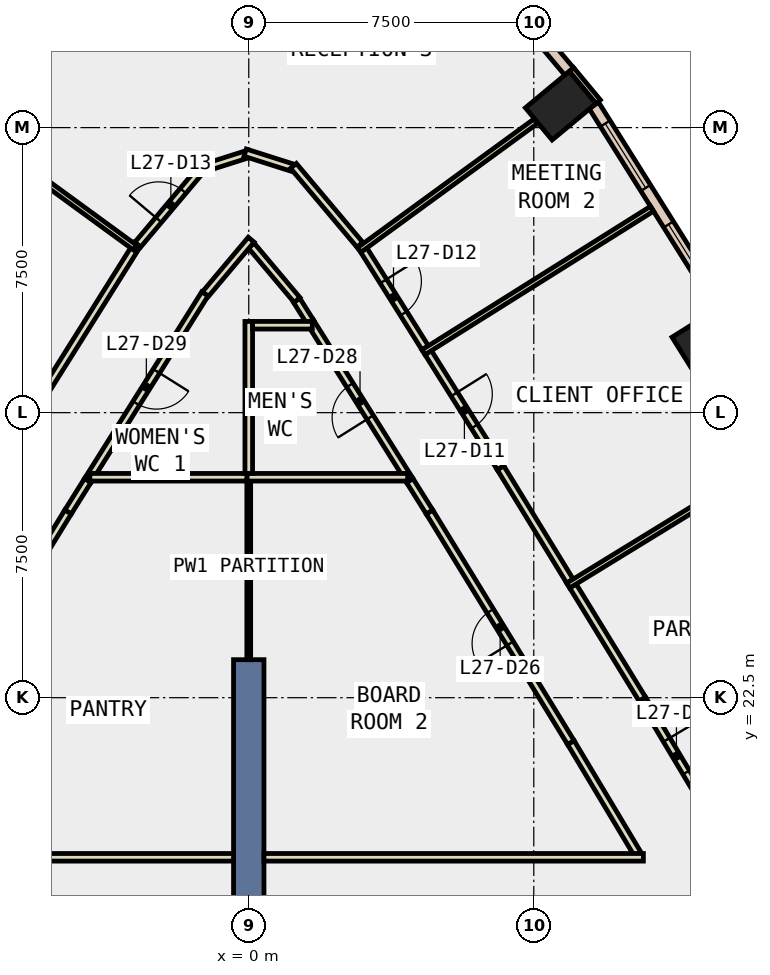
"""IFC4 building model, lengths in metres.
Left out: names, types, materials, properties, quantities, classifications, styles, units other than length and angle.
Written with IfcOpenShell. Run it as: python <this file> out.ifc"""

import sys

from ifc_helpers import new_model, si_unit, direction, frame, frame_2d, origin, origin_2d, place, context, subcontext, project, spatial, rectangle, extrude, element, fill, save


model = new_model("IFC4")
c1 = context("Model", 3, precision=1e-05, world=origin(), true_north=direction((0.0, 1.0)))
c2 = subcontext(c1, "Body", "Model", "MODEL_VIEW")
j1 = project(units=[si_unit("LENGTHUNIT", "METRE"), si_unit("PLANEANGLEUNIT", "RADIAN")], contexts=[c1])
p1 = place(None, origin())
s1 = spatial("IfcSite", under=j1, at=p1, CompositionType="ELEMENT")
p2 = place(p1, origin())
s2 = spatial("IfcBuilding", under=s1, at=p2, CompositionType="ELEMENT")
p3 = place(p2, frame((0.0, 0.0, 124.4)))
s3 = spatial("IfcBuildingStorey", under=s2, at=p3, CompositionType="ELEMENT", Elevation=124.4)
for number, where, z_axis, x_axis in (
    (1, (12.066, 31.917, -0.4), (0.0, 0.0, 1.0), (-0.53, 0.848, 0.0)),
    (2, (8.208, 38.077, -0.4), (0.0, 0.0, 1.0), (-0.638, 0.77, 0.0)),
):
    element("IfcColumn", number, at=place(p3, frame(where, z_axis=z_axis, x_axis=x_axis)), inside=s3, PredefinedType="COLUMN", context=c2, shape_type="SweptSolid", body=[
        extrude(rectangle(XDim=1.1, YDim=1.5, at=origin_2d()), origin(), (0.0, 0.0, 1.0), 4.2),
    ])
p4 = place(p3, frame((0.0, 14.5, -0.4), z_axis=(0.0, 0.0, 1.0), x_axis=(0.0, 1.0, 0.0)))
e3 = element("IfcWall", 3, at=p4, inside=s3, PredefinedType="SHEAR", context=c2, shape_type="SweptSolid", body=[
    extrude(rectangle(XDim=9.0, YDim=0.8, at=frame_2d((4.5, 0.0))), origin(), (0.0, 0.0, 1.0), 4.2),
])
p5 = place(p3, frame((9.194, 38.181, 0.0), z_axis=(0.0, 0.0, 1.0), x_axis=(-0.638566874111, 0.769566337159, 0.0)))
e4 = element("IfcWall", 4, at=p5, inside=s3, PredefinedType="STANDARD", context=c2, shape_type="SweptSolid", body=[
    extrude(rectangle(XDim=1.1, YDim=0.15, at=frame_2d((0.55, 0.0))), origin(), (0.0, 0.0, 1.0), 3.8),
])
p6 = place(p3, frame((12.41, 32.779, 0.0), z_axis=(0.0, 0.0, 1.0), x_axis=(-0.53160564075, 0.846991996847, 0.0)))
e5 = element("IfcWall", 5, at=p6, inside=s3, PredefinedType="STANDARD", context=c2, shape_type="SweptSolid", body=[
    extrude(rectangle(XDim=6.266, YDim=0.3, at=frame_2d((3.133, 0.0))), origin(), (0.0, 0.0, 1.0), 3.8),
])
p7 = place(p6, frame((0.566, 0.0, 0.9)))
e6 = element("IfcOpeningElement", 6, at=p7, cuts=e5, PredefinedType="OPENING", context=c2, shape_type="SweptSolid", body=[
    extrude(rectangle(XDim=2.0, YDim=2.6, at=frame_2d((1.0, 1.3))), frame((0.0, 0.16, 0.0), z_axis=(0.0, -1.0, 0.0), x_axis=(1.0, 0.0, 0.0)), (0.0, 0.0, 1.0), 0.32),
])
p8 = place(p6, frame((3.699, 0.0, 0.9)))
e7 = element("IfcOpeningElement", 7, at=p8, cuts=e5, PredefinedType="OPENING", context=c2, shape_type="SweptSolid", body=[
    extrude(rectangle(XDim=2.0, YDim=2.6, at=frame_2d((1.0, 1.3))), frame((0.0, 0.16, 0.0), z_axis=(0.0, -1.0, 0.0), x_axis=(1.0, 0.0, 0.0)), (0.0, 0.0, 1.0), 0.32),
])
p9 = place(p3, frame((8.432, 38.976, 0.0), z_axis=(0.0, 0.0, 1.0), x_axis=(-0.643948600943, 0.765068754652, 0.0)))
e8 = element("IfcWall", 8, at=p9, inside=s3, PredefinedType="STANDARD", context=c2, shape_type="SweptSolid", body=[
    extrude(rectangle(XDim=4.138, YDim=0.3, at=frame_2d((2.069, 0.0))), origin(), (0.0, 0.0, 1.0), 3.8),
])
p10 = place(p9, frame((1.369, 0.0, 0.9)))
e9 = element("IfcOpeningElement", 9, at=p10, cuts=e8, PredefinedType="OPENING", context=c2, shape_type="SweptSolid", body=[
    extrude(rectangle(XDim=1.4, YDim=2.6, at=frame_2d((0.7, 1.3))), frame((0.0, 0.16, 0.0), z_axis=(0.0, -1.0, 0.0), x_axis=(1.0, 0.0, 0.0)), (0.0, 0.0, 1.0), 0.32),
])
p11 = place(p3, frame((10.232, 18.386, 0.0), z_axis=(0.0, 0.0, 1.0), x_axis=(-0.513592824646, 0.858034038062, 0.0)))
e10 = element("IfcWall", 10, at=p11, inside=s3, PredefinedType="PARTITIONING", context=c2, shape_type="SweptSolid", body=[
    extrude(rectangle(XDim=3.421, YDim=0.2, at=frame_2d((1.71, 0.0))), origin(), (0.0, 0.0, 1.0), 3.8),
])
p12 = place(p3, frame((8.475, 21.321, 0.0), z_axis=(0.0, 0.0, 1.0), x_axis=(-0.522743103274, 0.852490262689, 0.0)))
e11 = element("IfcWall", 11, at=p12, inside=s3, PredefinedType="PARTITIONING", context=c2, shape_type="SweptSolid", body=[
    extrude(rectangle(XDim=7.115, YDim=0.2, at=frame_2d((3.557, 0.0))), origin(), (0.0, 0.0, 1.0), 3.8),
])
p13 = place(p12, frame((3.057, 0.0, 0.0)))
e12 = element("IfcOpeningElement", 12, at=p13, cuts=e11, PredefinedType="OPENING", context=c2, shape_type="SweptSolid", body=[
    extrude(rectangle(XDim=1.0, YDim=2.1, at=frame_2d((0.5, 1.05))), frame((0.0, 0.11, 0.0), z_axis=(0.0, -1.0, 0.0), x_axis=(1.0, 0.0, 0.0)), (0.0, 0.0, 1.0), 0.22),
])
for number, where, z_axis, x_axis in (
    (13, (4.756, 27.386, 0.0), (0.0, 0.0, 1.0), (-0.531, 0.847, 0.0)),
    (14, (-4.236, 28.215, 0.0), (0.0, 0.0, 1.0), (-0.531, -0.847, 0.0)),
):
    element("IfcWall", number, at=place(p3, frame(where, z_axis=z_axis, x_axis=x_axis)), inside=s3, PredefinedType="PARTITIONING", context=c2, shape_type="SweptSolid", body=[
        extrude(rectangle(XDim=0.979, YDim=0.2, at=frame_2d((0.489, 0.0))), origin(), (0.0, 0.0, 1.0), 3.8),
    ])
p14 = place(p3, frame((-4.756, 27.386, 0.0), z_axis=(0.0, 0.0, 1.0), x_axis=(-0.522743103274, -0.852490262689, 0.0)))
e15 = element("IfcWall", 15, at=p14, inside=s3, PredefinedType="PARTITIONING", context=c2, shape_type="SweptSolid", body=[
    extrude(rectangle(XDim=7.115, YDim=0.2, at=frame_2d((3.557, 0.0))), origin(), (0.0, 0.0, 1.0), 3.8),
])
p15 = place(p14, frame((3.057, 0.0, 0.0)))
e16 = element("IfcOpeningElement", 16, at=p15, cuts=e15, PredefinedType="OPENING", context=c2, shape_type="SweptSolid", body=[
    extrude(rectangle(XDim=1.0, YDim=2.1, at=frame_2d((0.5, 1.05))), frame((0.0, 0.11, 0.0), z_axis=(0.0, -1.0, 0.0), x_axis=(1.0, 0.0, 0.0)), (0.0, 0.0, 1.0), 0.22),
])
p16 = place(p3, frame((4.236, 28.215, 0.0), z_axis=(0.0, 0.0, 1.0), x_axis=(-0.531602694807, 0.84699384583, 0.0)))
e17 = element("IfcWall", 17, at=p16, inside=s3, PredefinedType="PARTITIONING", context=c2, shape_type="SweptSolid", body=[
    extrude(rectangle(XDim=4.923, YDim=0.2, at=frame_2d((2.461, 0.0))), origin(), (0.0, 0.0, 1.0), 3.8),
])
p17 = place(p16, frame((1.961, 0.0, 0.0)))
e18 = element("IfcOpeningElement", 18, at=p17, cuts=e17, PredefinedType="OPENING", context=c2, shape_type="SweptSolid", body=[
    extrude(rectangle(XDim=1.0, YDim=2.1, at=frame_2d((0.5, 1.05))), frame((0.0, 0.11, 0.0), z_axis=(0.0, -1.0, 0.0), x_axis=(1.0, 0.0, 0.0)), (0.0, 0.0, 1.0), 0.22),
])
p18 = place(p3, frame((1.619, 32.385, 0.0), z_axis=(0.0, 0.0, 1.0), x_axis=(-0.532112237469, 0.84667382547, 0.0)))
e19 = element("IfcWall", 19, at=p18, inside=s3, PredefinedType="PARTITIONING", context=c2, shape_type="SweptSolid", body=[
    extrude(rectangle(XDim=0.675, YDim=0.2, at=frame_2d((0.337, 0.0))), origin(), (0.0, 0.0, 1.0), 3.8),
])
p19 = place(p3, frame((1.271, 32.964, 0.0), z_axis=(0.0, 0.0, 1.0), x_axis=(-0.644007376392, 0.765019280249, 0.0)))
e20 = element("IfcWall", 20, at=p19, inside=s3, PredefinedType="PARTITIONING", context=c2, shape_type="SweptSolid", body=[
    extrude(rectangle(XDim=1.874, YDim=0.2, at=frame_2d((0.937, 0.0))), origin(), (0.0, 0.0, 1.0), 3.8),
])
p20 = place(p3, frame((0.064, 34.551, 0.0), z_axis=(0.0, 0.0, 1.0), x_axis=(-0.643638095982, -0.765329995101, 0.0)))
e21 = element("IfcWall", 21, at=p20, inside=s3, PredefinedType="PARTITIONING", context=c2, shape_type="SweptSolid", body=[
    extrude(rectangle(XDim=1.874, YDim=0.2, at=frame_2d((0.937, 0.0))), origin(), (0.0, 0.0, 1.0), 3.8),
])
p21 = place(p3, frame((-1.154, 33.125, 0.0), z_axis=(0.0, 0.0, 1.0), x_axis=(-0.531652223099, -0.846962758139, 0.0)))
e22 = element("IfcWall", 22, at=p21, inside=s3, PredefinedType="PARTITIONING", context=c2, shape_type="SweptSolid", body=[
    extrude(rectangle(XDim=5.797, YDim=0.2, at=frame_2d((2.898, 0.0))), origin(), (0.0, 0.0, 1.0), 3.8),
])
p22 = place(p21, frame((2.399, 0.0, 0.0)))
e23 = element("IfcOpeningElement", 23, at=p22, cuts=e22, PredefinedType="OPENING", context=c2, shape_type="SweptSolid", body=[
    extrude(rectangle(XDim=1.0, YDim=2.1, at=frame_2d((0.5, 1.05))), frame((0.0, 0.11, 0.0), z_axis=(0.0, -1.0, 0.0), x_axis=(1.0, 0.0, 0.0)), (0.0, 0.0, 1.0), 0.22),
])
p23 = place(p3, frame((8.531, 25.439, 0.0), z_axis=(0.0, 0.0, 1.0), x_axis=(0.522704631836, -0.852513852003, 0.0)))
e24 = element("IfcWall", 24, at=p23, inside=s3, PredefinedType="PARTITIONING", context=c2, shape_type="SweptSolid", body=[
    extrude(rectangle(XDim=3.493, YDim=0.2, at=frame_2d((1.747, 0.0))), origin(), (0.0, 0.0, 1.0), 3.8),
])
p24 = place(p3, frame((10.357, 22.461, 0.0), z_axis=(0.0, 0.0, 1.0), x_axis=(0.513467759888, -0.858108885606, 0.0)))
e25 = element("IfcWall", 25, at=p24, inside=s3, PredefinedType="PARTITIONING", context=c2, shape_type="SweptSolid", body=[
    extrude(rectangle(XDim=3.494, YDim=0.2, at=frame_2d((1.747, 0.0))), origin(), (0.0, 0.0, 1.0), 3.8),
])
p25 = place(p24, frame((1.247, 0.0, 0.0)))
e26 = element("IfcOpeningElement", 26, at=p25, cuts=e25, PredefinedType="OPENING", context=c2, shape_type="SweptSolid", body=[
    extrude(rectangle(XDim=1.0, YDim=2.1, at=frame_2d((0.5, 1.05))), frame((0.0, 0.11, 0.0), z_axis=(0.0, -1.0, 0.0), x_axis=(1.0, 0.0, 0.0)), (0.0, 0.0, 1.0), 0.22),
])
p26 = place(p3, frame((4.722, 31.579, 0.0), z_axis=(0.0, 0.0, 1.0), x_axis=(0.531664655861, -0.846954953766, 0.0)))
e27 = element("IfcWall", 27, at=p26, inside=s3, PredefinedType="PARTITIONING", context=c2, shape_type="SweptSolid", body=[
    extrude(rectangle(XDim=3.581, YDim=0.2, at=frame_2d((1.791, 0.0))), origin(), (0.0, 0.0, 1.0), 3.8),
])
p27 = place(p26, frame((1.291, 0.0, 0.0)))
e28 = element("IfcOpeningElement", 28, at=p27, cuts=e27, PredefinedType="OPENING", context=c2, shape_type="SweptSolid", body=[
    extrude(rectangle(XDim=1.0, YDim=2.1, at=frame_2d((0.5, 1.05))), frame((0.0, 0.11, 0.0), z_axis=(0.0, -1.0, 0.0), x_axis=(1.0, 0.0, 0.0)), (0.0, 0.0, 1.0), 0.22),
])
p28 = place(p3, frame((6.626, 28.546, 0.0), z_axis=(0.0, 0.0, 1.0), x_axis=(0.522580081027, -0.852590205734, 0.0)))
e29 = element("IfcWall", 29, at=p28, inside=s3, PredefinedType="PARTITIONING", context=c2, shape_type="SweptSolid", body=[
    extrude(rectangle(XDim=3.494, YDim=0.2, at=frame_2d((1.747, 0.0))), origin(), (0.0, 0.0, 1.0), 3.8),
])
p29 = place(p3, frame((2.975, 34.361, 0.0), z_axis=(0.0, 0.0, 1.0), x_axis=(0.531740854333, -0.846907116414, 0.0)))
e30 = element("IfcWall", 30, at=p29, inside=s3, PredefinedType="PARTITIONING", context=c2, shape_type="SweptSolid", body=[
    extrude(rectangle(XDim=3.135, YDim=0.2, at=frame_2d((1.567, 0.0))), origin(), (0.0, 0.0, 1.0), 3.8),
])
p30 = place(p29, frame((1.068, 0.0, 0.0)))
e31 = element("IfcOpeningElement", 31, at=p30, cuts=e30, PredefinedType="OPENING", context=c2, shape_type="SweptSolid", body=[
    extrude(rectangle(XDim=1.0, YDim=2.1, at=frame_2d((0.5, 1.05))), frame((0.0, 0.11, 0.0), z_axis=(0.0, -1.0, 0.0), x_axis=(1.0, 0.0, 0.0)), (0.0, 0.0, 1.0), 0.22),
])
p31 = place(p3, frame((-2.924, 34.417, 0.0), z_axis=(0.0, 0.0, 1.0), x_axis=(0.644113583568, 0.764929860486, 0.0)))
e32 = element("IfcWall", 32, at=p31, inside=s3, PredefinedType="PARTITIONING", context=c2, shape_type="SweptSolid", body=[
    extrude(rectangle(XDim=2.714, YDim=0.2, at=frame_2d((1.357, 0.0))), origin(), (0.0, 0.0, 1.0), 3.8),
])
p32 = place(p31, frame((0.857, 0.0, 0.0)))
e33 = element("IfcOpeningElement", 33, at=p32, cuts=e32, PredefinedType="OPENING", context=c2, shape_type="SweptSolid", body=[
    extrude(rectangle(XDim=1.0, YDim=2.1, at=frame_2d((0.5, 1.05))), frame((0.0, 0.11, 0.0), z_axis=(0.0, -1.0, 0.0), x_axis=(1.0, 0.0, 0.0)), (0.0, 0.0, 1.0), 0.22),
])
p33 = place(p3, frame((-1.145, 36.447, 0.0), z_axis=(0.0, 0.0, 1.0), x_axis=(0.952957783381, 0.303103056886, 0.0)))
e34 = element("IfcWall", 34, at=p33, inside=s3, PredefinedType="PARTITIONING", context=c2, shape_type="SweptSolid", body=[
    extrude(rectangle(XDim=1.102, YDim=0.2, at=frame_2d((0.551, 0.0))), origin(), (0.0, 0.0, 1.0), 3.8),
])
p34 = place(p3, frame((-0.095, 36.841, 0.0), z_axis=(0.0, 0.0, 1.0), x_axis=(0.953036611979, -0.302855107646, 0.0)))
e35 = element("IfcWall", 35, at=p34, inside=s3, PredefinedType="PARTITIONING", context=c2, shape_type="SweptSolid", body=[
    extrude(rectangle(XDim=1.301, YDim=0.2, at=frame_2d((0.65, 0.0))), origin(), (0.0, 0.0, 1.0), 3.8),
])
p35 = place(p3, frame((1.176, 36.493, 0.0), z_axis=(0.0, 0.0, 1.0), x_axis=(0.644113583568, -0.764929860486, 0.0)))
e36 = element("IfcWall", 36, at=p35, inside=s3, PredefinedType="PARTITIONING", context=c2, shape_type="SweptSolid", body=[
    extrude(rectangle(XDim=2.714, YDim=0.2, at=frame_2d((1.357, 0.0))), origin(), (0.0, 0.0, 1.0), 3.8),
])
p36 = place(p3, frame((-6.626, 28.546, 0.0), z_axis=(0.0, 0.0, 1.0), x_axis=(0.531701842465, 0.846931609234, 0.0)))
e37 = element("IfcWall", 37, at=p36, inside=s3, PredefinedType="PARTITIONING", context=c2, shape_type="SweptSolid", body=[
    extrude(rectangle(XDim=6.942, YDim=0.2, at=frame_2d((3.471, 0.0))), origin(), (0.0, 0.0, 1.0), 3.8),
])
for number, where, z_axis, x_axis in (
    (38, (0.4, 18.3, 0.0), (0.0, 0.0, 1.0), (1.0, 0.0, 0.0)),
    (39, (-10.384, 18.3, 0.0), (0.0, 0.0, 1.0), (1.0, 0.0, 0.0)),
):
    element("IfcWall", number, at=place(p3, frame(where, z_axis=z_axis, x_axis=x_axis)), inside=s3, PredefinedType="PARTITIONING", context=c2, shape_type="SweptSolid", body=[
        extrude(rectangle(XDim=9.984, YDim=0.2, at=frame_2d((4.992, 0.0))), origin(), (0.0, 0.0, 1.0), 3.8),
    ])
p37 = place(p3, frame((0.0, 23.5, 0.0), z_axis=(0.0, 0.0, 1.0), x_axis=(0.0, 1.0, 0.0)))
e40 = element("IfcWall", 40, at=p37, inside=s3, PredefinedType="PARTITIONING", context=c2, shape_type="SweptSolid", body=[
    extrude(rectangle(XDim=4.9, YDim=0.1, at=frame_2d((2.45, 0.0))), origin(), (0.0, 0.0, 1.0), 3.8),
])
p38 = place(p3, frame((-0.05, 28.3, 0.0), z_axis=(0.0, 0.0, 1.0), x_axis=(1.0, 0.0, 0.0)))
e41 = element("IfcWall", 41, at=p38, inside=s3, PredefinedType="PARTITIONING", context=c2, shape_type="SweptSolid", body=[
    extrude(rectangle(XDim=4.232, YDim=0.2, at=frame_2d((2.116, 0.0))), origin(), (0.0, 0.0, 1.0), 3.8),
])
p39 = place(p3, frame((-4.182, 28.3, 0.0), z_axis=(0.0, 0.0, 1.0), x_axis=(1.0, 0.0, 0.0)))
e42 = element("IfcWall", 42, at=p39, inside=s3, PredefinedType="PARTITIONING", context=c2, shape_type="SweptSolid", body=[
    extrude(rectangle(XDim=4.132, YDim=0.2, at=frame_2d((2.066, 0.0))), origin(), (0.0, 0.0, 1.0), 3.8),
])
p40 = place(p3, frame((0.0, 28.4, 0.0), z_axis=(0.0, 0.0, 1.0), x_axis=(0.0, 1.0, 0.0)))
e43 = element("IfcWall", 43, at=p40, inside=s3, PredefinedType="PARTITIONING", context=c2, shape_type="SweptSolid", body=[
    extrude(rectangle(XDim=4.0, YDim=0.2, at=frame_2d((2.0, 0.0))), origin(), (0.0, 0.0, 1.0), 3.8),
])
p41 = place(p3, frame((0.1, 32.3, 0.0), z_axis=(0.0, 0.0, 1.0), x_axis=(1.0, 0.0, 0.0)))
e44 = element("IfcWall", 44, at=p41, inside=s3, PredefinedType="PARTITIONING", context=c2, shape_type="SweptSolid", body=[
    extrude(rectangle(XDim=1.572, YDim=0.2, at=frame_2d((0.786, 0.0))), origin(), (0.0, 0.0, 1.0), 3.8),
])
p42 = place(p3, frame((8.406, 25.451, 0.0), z_axis=(0.0, 0.0, 1.0), x_axis=(0.852520194289, 0.522694287637, 0.0)))
e45 = element("IfcWall", 45, at=p42, inside=s3, PredefinedType="PARTITIONING", context=c2, shape_type="SweptSolid", body=[
    extrude(rectangle(XDim=7.1, YDim=0.15, at=frame_2d((3.55, 0.0))), origin(), (0.0, 0.0, 1.0), 3.8),
])
p43 = place(p3, frame((4.597, 31.589, 0.0), z_axis=(0.0, 0.0, 1.0), x_axis=(0.846980720953, 0.531623605885, 0.0)))
e46 = element("IfcWall", 46, at=p43, inside=s3, PredefinedType="PARTITIONING", context=c2, shape_type="SweptSolid", body=[
    extrude(rectangle(XDim=7.101, YDim=0.15, at=frame_2d((3.55, 0.0))), origin(), (0.0, 0.0, 1.0), 3.8),
])
p44 = place(p3, frame((2.908, 34.281, 0.0), z_axis=(0.0, 0.0, 1.0), x_axis=(0.807935867, 0.589270425879, 0.0)))
e47 = element("IfcWall", 47, at=p44, inside=s3, PredefinedType="PARTITIONING", context=c2, shape_type="SweptSolid", body=[
    extrude(rectangle(XDim=5.744, YDim=0.15, at=frame_2d((2.872, 0.0))), origin(), (0.0, 0.0, 1.0), 3.8),
])
p45 = place(p3, frame((-2.989, 34.34, 0.0), z_axis=(0.0, 0.0, 1.0), x_axis=(-0.807932877043, 0.589274525322, 0.0)))
e48 = element("IfcWall", 48, at=p45, inside=s3, PredefinedType="PARTITIONING", context=c2, shape_type="SweptSolid", body=[
    extrude(rectangle(XDim=5.644, YDim=0.15, at=frame_2d((2.822, 0.0))), origin(), (0.0, 0.0, 1.0), 3.8),
])
p46 = place(p7, origin())
e49 = element("IfcWindow", 49, at=p46, inside=s3, PartitioningType="SINGLE_PANEL", PredefinedType="WINDOW", context=c2, shape_type="SweptSolid", body=[
    extrude(rectangle(XDim=2.0, YDim=2.6, at=frame_2d((1.0, 1.3))), frame((0.0, 0.03, 0.0), z_axis=(0.0, -1.0, 0.0), x_axis=(1.0, 0.0, 0.0)), (0.0, 0.0, 1.0), 0.06),
])
fill(e6, e49)
p47 = place(p8, origin())
e50 = element("IfcWindow", 50, at=p47, inside=s3, PartitioningType="SINGLE_PANEL", PredefinedType="WINDOW", context=c2, shape_type="SweptSolid", body=[
    extrude(rectangle(XDim=2.0, YDim=2.6, at=frame_2d((1.0, 1.3))), frame((0.0, 0.03, 0.0), z_axis=(0.0, -1.0, 0.0), x_axis=(1.0, 0.0, 0.0)), (0.0, 0.0, 1.0), 0.06),
])
fill(e7, e50)
p48 = place(p25, origin())
e51 = element("IfcDoor", 51, at=p48, inside=s3, OperationType="SINGLE_SWING_RIGHT", PredefinedType="DOOR", context=c2, shape_type="SweptSolid", body=[
    extrude(rectangle(XDim=1.0, YDim=2.1, at=frame_2d((0.5, 1.05))), frame((0.0, 0.025, 0.0), z_axis=(0.0, -1.0, 0.0), x_axis=(1.0, 0.0, 0.0)), (0.0, 0.0, 1.0), 0.05),
])
fill(e26, e51)
p49 = place(p27, origin())
e52 = element("IfcDoor", 52, at=p49, inside=s3, OperationType="SINGLE_SWING_LEFT", PredefinedType="DOOR", context=c2, shape_type="SweptSolid", body=[
    extrude(rectangle(XDim=1.0, YDim=2.1, at=frame_2d((0.5, 1.05))), frame((0.0, 0.025, 0.0), z_axis=(0.0, -1.0, 0.0), x_axis=(1.0, 0.0, 0.0)), (0.0, 0.0, 1.0), 0.05),
])
fill(e28, e52)
p50 = place(p30, origin())
e53 = element("IfcDoor", 53, at=p50, inside=s3, OperationType="SINGLE_SWING_LEFT", PredefinedType="DOOR", context=c2, shape_type="SweptSolid", body=[
    extrude(rectangle(XDim=1.0, YDim=2.1, at=frame_2d((0.5, 1.05))), frame((0.0, 0.025, 0.0), z_axis=(0.0, -1.0, 0.0), x_axis=(1.0, 0.0, 0.0)), (0.0, 0.0, 1.0), 0.05),
])
fill(e31, e53)
p51 = place(p32, origin())
e54 = element("IfcDoor", 54, at=p51, inside=s3, OperationType="SINGLE_SWING_LEFT", PredefinedType="DOOR", context=c2, shape_type="SweptSolid", body=[
    extrude(rectangle(XDim=1.0, YDim=2.1, at=frame_2d((0.5, 1.05))), frame((0.0, 0.025, 0.0), z_axis=(0.0, -1.0, 0.0), x_axis=(1.0, 0.0, 0.0)), (0.0, 0.0, 1.0), 0.05),
])
fill(e33, e54)
p52 = place(p13, origin())
e55 = element("IfcDoor", 55, at=p52, inside=s3, OperationType="SINGLE_SWING_RIGHT", PredefinedType="DOOR", context=c2, shape_type="SweptSolid", body=[
    extrude(rectangle(XDim=1.0, YDim=2.1, at=frame_2d((0.5, 1.05))), frame((0.0, 0.025, 0.0), z_axis=(0.0, -1.0, 0.0), x_axis=(1.0, 0.0, 0.0)), (0.0, 0.0, 1.0), 0.05),
])
fill(e12, e55)
p53 = place(p17, origin())
e56 = element("IfcDoor", 56, at=p53, inside=s3, OperationType="SINGLE_SWING_LEFT", PredefinedType="DOOR", context=c2, shape_type="SweptSolid", body=[
    extrude(rectangle(XDim=1.0, YDim=2.1, at=frame_2d((0.5, 1.05))), frame((0.0, 0.025, 0.0), z_axis=(0.0, -1.0, 0.0), x_axis=(1.0, 0.0, 0.0)), (0.0, 0.0, 1.0), 0.05),
])
fill(e18, e56)
p54 = place(p22, origin())
e57 = element("IfcDoor", 57, at=p54, inside=s3, OperationType="SINGLE_SWING_LEFT", PredefinedType="DOOR", context=c2, shape_type="SweptSolid", body=[
    extrude(rectangle(XDim=1.0, YDim=2.1, at=frame_2d((0.5, 1.05))), frame((0.0, 0.025, 0.0), z_axis=(0.0, -1.0, 0.0), x_axis=(1.0, 0.0, 0.0)), (0.0, 0.0, 1.0), 0.05),
])
fill(e23, e57)
save(model, sys.argv[1])
